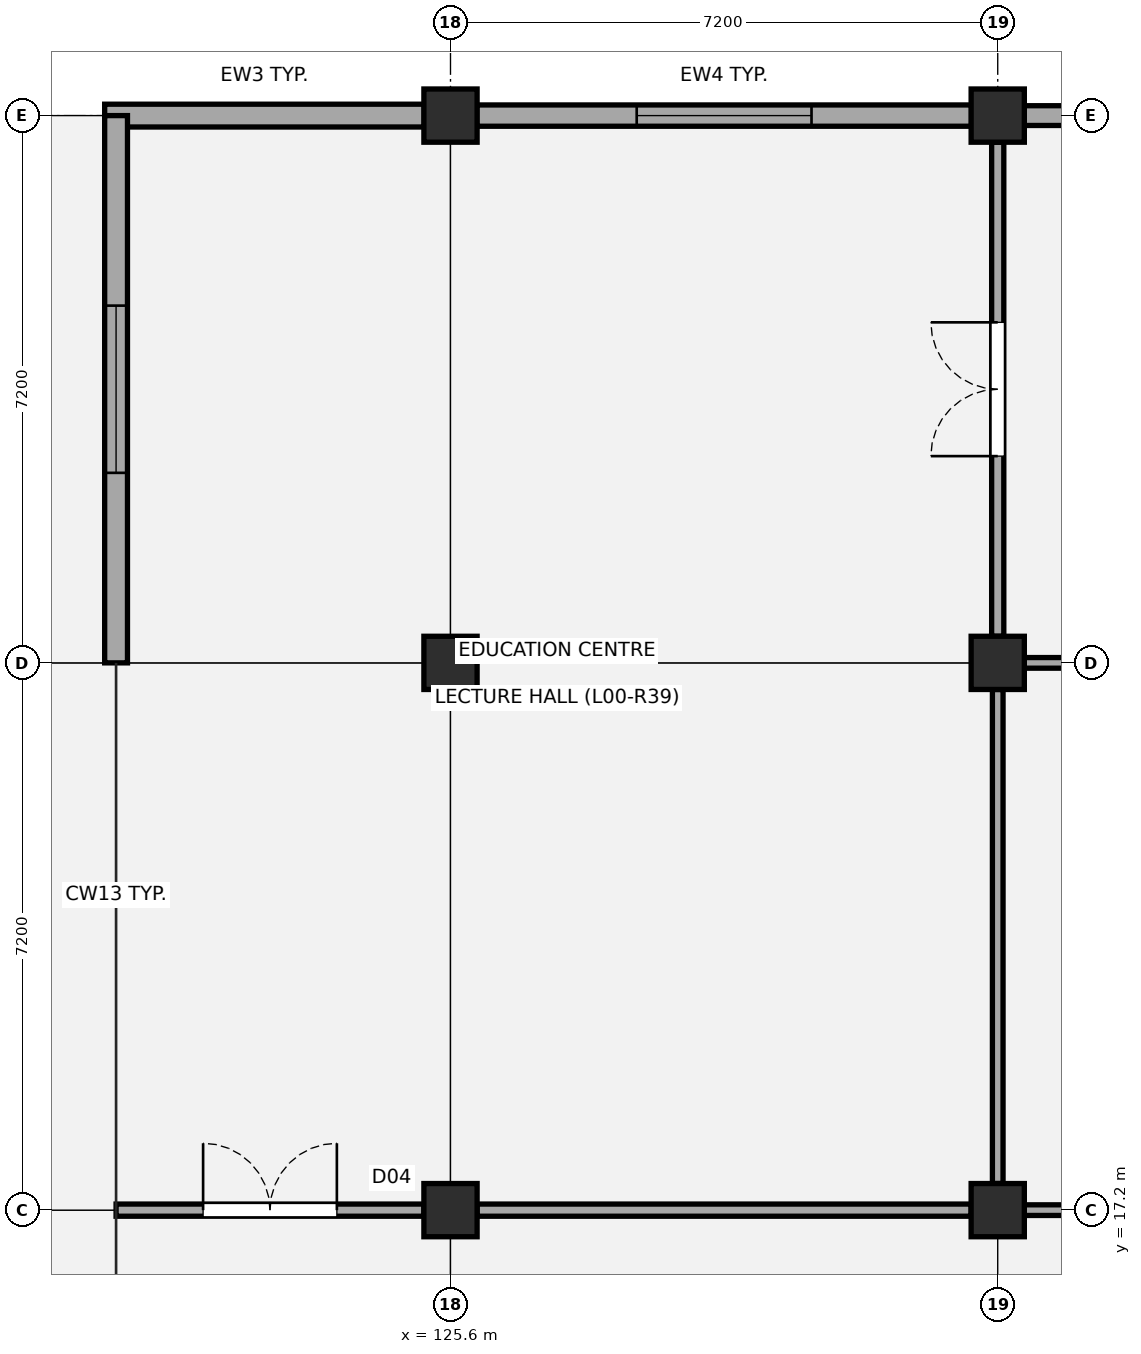
"""IFC4 building model, lengths in metres.
Left out: names, types, materials, properties, quantities, classifications, styles, units other than length and angle.
Written with IfcOpenShell. Run it as: python <this file> out.ifc"""

import sys

from ifc_helpers import new_model, si_unit, direction, frame, frame_2d, origin, origin_2d, place, context, subcontext, project, spatial, rectangle, extrude, element, fill, save


model = new_model("IFC4")
c1 = context("Model", 3, precision=1e-05, world=origin(), true_north=direction((0.0, 1.0)))
c2 = subcontext(c1, "Body", "Model", "MODEL_VIEW")
j1 = project(units=[si_unit("LENGTHUNIT", "METRE"), si_unit("PLANEANGLEUNIT", "RADIAN")], contexts=[c1])
p1 = place(None, origin())
s1 = spatial("IfcSite", under=j1, at=p1, CompositionType="ELEMENT")
p2 = place(p1, origin())
s2 = spatial("IfcBuilding", under=s1, at=p2, CompositionType="ELEMENT")
p3 = place(p2, origin())
s3 = spatial("IfcBuildingStorey", under=s2, at=p3, CompositionType="ELEMENT", Elevation=0.0)
for number, where, z_axis, x_axis in (
    (1, (125.6, 17.2, -0.35), (0.0, 0.0, 1.0), (1.0, 0.0, 0.0)),
    (2, (125.6, 24.4, -0.35), (0.0, 0.0, 1.0), (1.0, 0.0, 0.0)),
    (3, (125.6, 31.6, -0.35), (0.0, 0.0, 1.0), (1.0, 0.0, 0.0)),
    (4, (132.8, 17.2, -0.35), (0.0, 0.0, 1.0), (1.0, 0.0, 0.0)),
    (5, (132.8, 24.4, -0.35), (0.0, 0.0, 1.0), (1.0, 0.0, 0.0)),
    (6, (132.8, 31.6, -0.35), (0.0, 0.0, 1.0), (1.0, 0.0, 0.0)),
):
    element("IfcColumn", number, at=place(p3, frame(where, z_axis=z_axis, x_axis=x_axis)), inside=s3, PredefinedType="COLUMN", context=c2, shape_type="SweptSolid", body=[
        extrude(rectangle(XDim=0.7, YDim=0.7, at=origin_2d()), origin(), (0.0, 0.0, 1.0), 5.03),
    ])
p4 = place(p3, frame((121.05, 31.6, 0.0), z_axis=(0.0, 0.0, 1.0), x_axis=(1.0, 0.0, 0.0)))
e7 = element("IfcWall", 7, at=p4, inside=s3, PredefinedType="STANDARD", context=c2, shape_type="SweptSolid", body=[
    extrude(rectangle(XDim=4.205, YDim=0.3, at=frame_2d((2.103, 0.0))), origin(), (0.0, 0.0, 1.0), 3.67),
])
p5 = place(p3, frame((125.945, 31.6, 0.0), z_axis=(0.0, 0.0, 1.0), x_axis=(1.0, 0.0, 0.0)))
e8 = element("IfcWall", 8, at=p5, inside=s3, PredefinedType="STANDARD", context=c2, shape_type="SweptSolid", body=[
    extrude(rectangle(XDim=6.51, YDim=0.28, at=frame_2d((3.255, 0.0))), origin(), (0.0, 0.0, 1.0), 3.67),
])
p6 = place(p5, frame((2.105, 0.0, 0.95)))
e9 = element("IfcOpeningElement", 9, at=p6, cuts=e8, PredefinedType="OPENING", context=c2, shape_type="SweptSolid", body=[
    extrude(rectangle(XDim=2.3, YDim=1.5, at=frame_2d((1.15, 0.75))), frame((0.0, 0.15, 0.0), z_axis=(0.0, -1.0, 0.0), x_axis=(1.0, 0.0, 0.0)), (0.0, 0.0, 1.0), 0.3),
])
p7 = place(p3, frame((133.145, 31.6, 0.0), z_axis=(0.0, 0.0, 1.0), x_axis=(1.0, 0.0, 0.0)))
e10 = element("IfcWall", 10, at=p7, inside=s3, PredefinedType="STANDARD", context=c2, shape_type="SweptSolid", body=[
    extrude(rectangle(XDim=6.51, YDim=0.26, at=frame_2d((3.255, 0.0))), origin(), (0.0, 0.0, 1.0), 3.67),
])
p8 = place(p7, frame((2.005, 0.0, 0.95)))
e11 = element("IfcOpeningElement", 11, at=p8, cuts=e10, PredefinedType="OPENING", context=c2, shape_type="SweptSolid", body=[
    extrude(rectangle(XDim=2.5, YDim=1.6, at=frame_2d((1.25, 0.8))), frame((0.0, 0.14, 0.0), z_axis=(0.0, -1.0, 0.0), x_axis=(1.0, 0.0, 0.0)), (0.0, 0.0, 1.0), 0.28),
])
p9 = place(p3, frame((121.2, 31.6, 0.0), z_axis=(0.0, 0.0, 1.0), x_axis=(0.0, -1.0, 0.0)))
e12 = element("IfcWall", 12, at=p9, inside=s3, PredefinedType="STANDARD", context=c2, shape_type="SweptSolid", body=[
    extrude(rectangle(XDim=7.2, YDim=0.3, at=frame_2d((3.6, 0.0))), origin(), (0.0, 0.0, 1.0), 4.37),
])
p10 = place(p9, frame((2.5, 0.0, 0.95)))
e13 = element("IfcOpeningElement", 13, at=p10, cuts=e12, PredefinedType="OPENING", context=c2, shape_type="SweptSolid", body=[
    extrude(rectangle(XDim=2.2, YDim=2.0, at=frame_2d((1.1, 1.0))), frame((0.0, 0.16, 0.0), z_axis=(0.0, -1.0, 0.0), x_axis=(1.0, 0.0, 0.0)), (0.0, 0.0, 1.0), 0.32),
])
p11 = place(p3, frame((133.15, 17.2, 0.0), z_axis=(0.0, 0.0, 1.0), x_axis=(1.0, 0.0, 0.0)))
e14 = element("IfcWall", 14, at=p11, inside=s3, PredefinedType="PARTITIONING", context=c2, shape_type="SweptSolid", body=[
    extrude(rectangle(XDim=4.1, YDim=0.14, at=frame_2d((2.05, 0.0))), origin(), (0.0, 0.0, 1.0), 3.52),
])
p12 = place(p11, frame((1.59, 0.0, 0.0)))
e15 = element("IfcOpeningElement", 15, at=p12, cuts=e14, PredefinedType="OPENING", context=c2, shape_type="SweptSolid", body=[
    extrude(rectangle(XDim=0.92, YDim=2.08, at=frame_2d((0.46, 1.04))), frame((0.0, 0.08, 0.0), z_axis=(0.0, -1.0, 0.0), x_axis=(1.0, 0.0, 0.0)), (0.0, 0.0, 1.0), 0.16),
])
for number, where, z_axis, x_axis in (
    (16, (133.15, 24.4, 0.0), (0.0, 0.0, 1.0), (1.0, 0.0, 0.0)),
    (17, (132.8, 17.55, 0.0), (0.0, 0.0, 1.0), (0.0, 1.0, 0.0)),
):
    element("IfcWall", number, at=place(p3, frame(where, z_axis=z_axis, x_axis=x_axis)), inside=s3, PredefinedType="PARTITIONING", context=c2, shape_type="SweptSolid", body=[
        extrude(rectangle(XDim=6.5, YDim=0.14, at=frame_2d((3.25, 0.0))), origin(), (0.0, 0.0, 1.0), 3.62),
    ])
p13 = place(p3, frame((121.2, 17.2, 0.0), z_axis=(0.0, 0.0, 1.0), x_axis=(1.0, 0.0, 0.0)))
e18 = element("IfcWall", 18, at=p13, inside=s3, PredefinedType="PARTITIONING", context=c2, shape_type="SweptSolid", body=[
    extrude(rectangle(XDim=4.05, YDim=0.16, at=frame_2d((2.025, 0.0))), origin(), (0.0, 0.0, 1.0), 3.52),
])
p14 = place(p13, frame((1.145, 0.0, 0.0)))
e19 = element("IfcOpeningElement", 19, at=p14, cuts=e18, PredefinedType="OPENING", context=c2, shape_type="SweptSolid", body=[
    extrude(rectangle(XDim=1.76, YDim=2.22, at=frame_2d((0.88, 1.11))), frame((0.0, 0.09, 0.0), z_axis=(0.0, -1.0, 0.0), x_axis=(1.0, 0.0, 0.0)), (0.0, 0.0, 1.0), 0.18),
])
p15 = place(p3, frame((125.95, 17.2, 0.0), z_axis=(0.0, 0.0, 1.0), x_axis=(1.0, 0.0, 0.0)))
e20 = element("IfcWall", 20, at=p15, inside=s3, PredefinedType="PARTITIONING", context=c2, shape_type="SweptSolid", body=[
    extrude(rectangle(XDim=6.5, YDim=0.16, at=frame_2d((3.25, 0.0))), origin(), (0.0, 0.0, 1.0), 3.62),
])
p16 = place(p3, frame((132.8, 24.75, 0.0), z_axis=(0.0, 0.0, 1.0), x_axis=(0.0, 1.0, 0.0)))
e21 = element("IfcWall", 21, at=p16, inside=s3, PredefinedType="PARTITIONING", context=c2, shape_type="SweptSolid", body=[
    extrude(rectangle(XDim=6.5, YDim=0.16, at=frame_2d((3.25, 0.0))), origin(), (0.0, 0.0, 1.0), 3.62),
])
p17 = place(p16, frame((2.37, 0.0, 0.0)))
e22 = element("IfcOpeningElement", 22, at=p17, cuts=e21, PredefinedType="OPENING", context=c2, shape_type="SweptSolid", body=[
    extrude(rectangle(XDim=1.76, YDim=2.22, at=frame_2d((0.88, 1.11))), frame((0.0, 0.09, 0.0), z_axis=(0.0, -1.0, 0.0), x_axis=(1.0, 0.0, 0.0)), (0.0, 0.0, 1.0), 0.18),
])
p18 = place(p6, origin())
e23 = element("IfcWindow", 23, at=p18, inside=s3, PartitioningType="SINGLE_PANEL", PredefinedType="WINDOW", context=c2, shape_type="SweptSolid", body=[
    extrude(rectangle(XDim=2.3, YDim=1.5, at=frame_2d((1.15, 0.75))), frame((0.0, 0.03, 0.0), z_axis=(0.0, -1.0, 0.0), x_axis=(1.0, 0.0, 0.0)), (0.0, 0.0, 1.0), 0.06),
])
fill(e9, e23)
p19 = place(p10, origin())
e24 = element("IfcWindow", 24, at=p19, inside=s3, PartitioningType="SINGLE_PANEL", PredefinedType="WINDOW", context=c2, shape_type="SweptSolid", body=[
    extrude(rectangle(XDim=2.2, YDim=2.0, at=frame_2d((1.1, 1.0))), frame((0.0, 0.03, 0.0), z_axis=(0.0, -1.0, 0.0), x_axis=(1.0, 0.0, 0.0)), (0.0, 0.0, 1.0), 0.06),
])
fill(e13, e24)
p20 = place(p14, origin())
e25 = element("IfcDoor", 25, at=p20, inside=s3, OperationType="DOUBLE_DOOR_SINGLE_SWING", PredefinedType="DOOR", context=c2, shape_type="SweptSolid", body=[
    extrude(rectangle(XDim=1.76, YDim=2.22, at=frame_2d((0.88, 1.11))), frame((0.0, 0.025, 0.0), z_axis=(0.0, -1.0, 0.0), x_axis=(1.0, 0.0, 0.0)), (0.0, 0.0, 1.0), 0.05),
])
fill(e19, e25)
p21 = place(p17, origin())
e26 = element("IfcDoor", 26, at=p21, inside=s3, OperationType="DOUBLE_DOOR_SINGLE_SWING", PredefinedType="DOOR", context=c2, shape_type="SweptSolid", body=[
    extrude(rectangle(XDim=1.76, YDim=2.22, at=frame_2d((0.88, 1.11))), frame((0.0, 0.025, 0.0), z_axis=(0.0, -1.0, 0.0), x_axis=(1.0, 0.0, 0.0)), (0.0, 0.0, 1.0), 0.05),
])
fill(e22, e26)
save(model, sys.argv[1])
